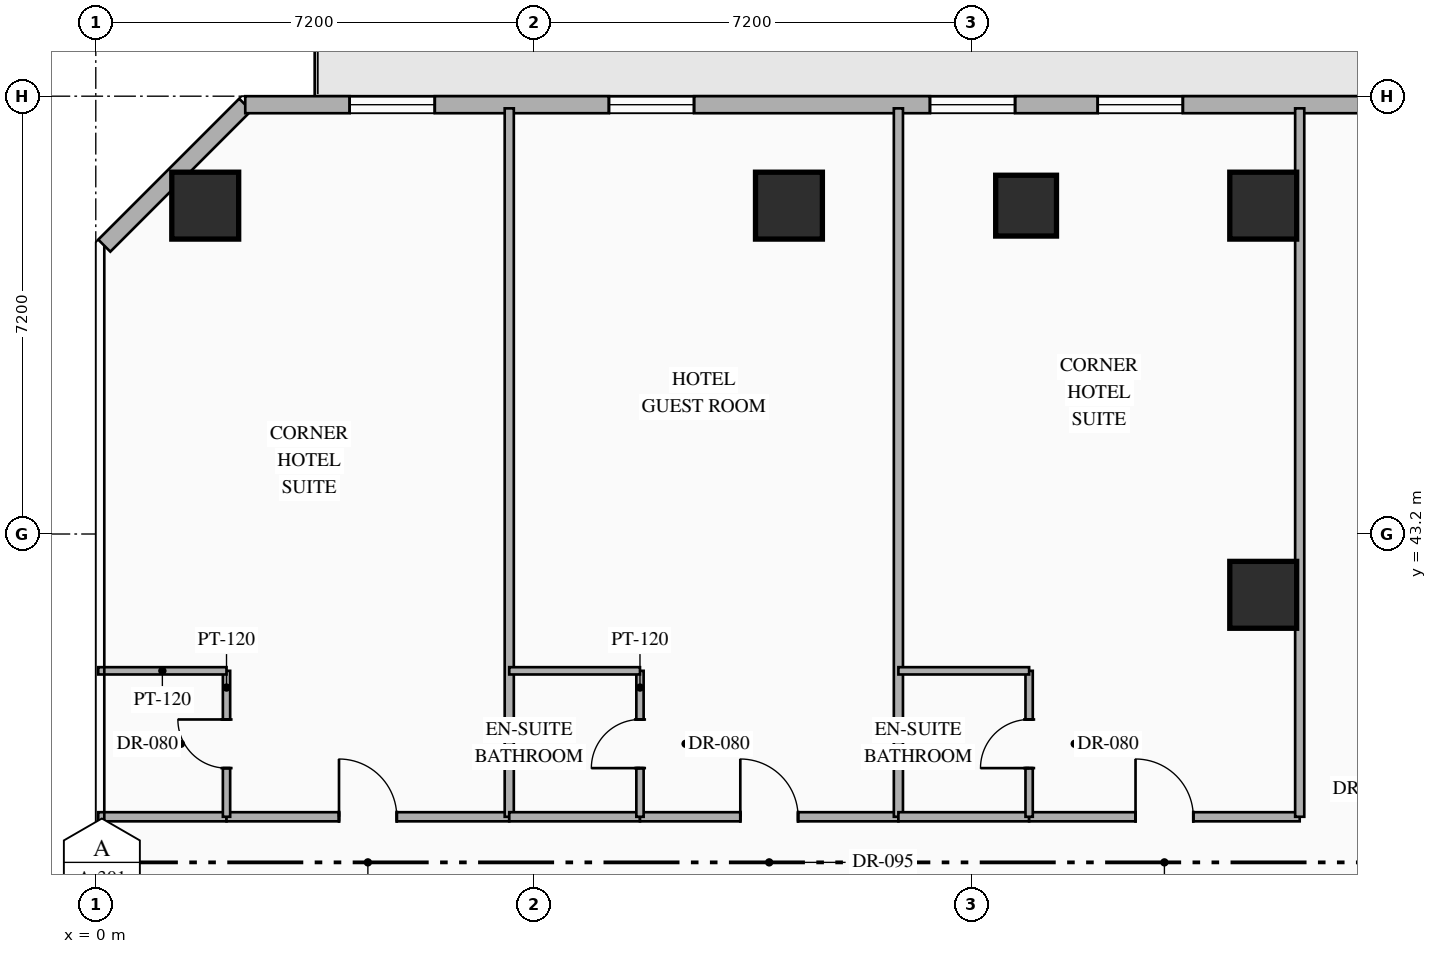
"""IFC4 building model, lengths in metres.
Left out: names, types, materials, properties, quantities, classifications, styles, units other than length and angle.
Written with IfcOpenShell. Run it as: python <this file> out.ifc"""

import sys

from ifc_helpers import new_model, si_unit, direction, frame, frame_2d, origin, origin_2d, place, context, subcontext, project, spatial, rectangle, hollow_rectangle, extrude, element, fill, save


model = new_model("IFC4")
c1 = context("Model", 3, precision=1e-05, world=origin(), true_north=direction((0.0, 1.0)))
c2 = subcontext(c1, "Body", "Model", "MODEL_VIEW")
j1 = project(units=[si_unit("LENGTHUNIT", "METRE"), si_unit("PLANEANGLEUNIT", "RADIAN")], contexts=[c1])
p1 = place(None, origin())
s1 = spatial("IfcSite", under=j1, at=p1, CompositionType="ELEMENT")
p2 = place(p1, origin())
s2 = spatial("IfcBuilding", under=s1, at=p2, CompositionType="ELEMENT")
p3 = place(p2, frame((0.0, 0.0, 36.6)))
s3 = spatial("IfcBuildingStorey", under=s2, at=p3, CompositionType="ELEMENT", Elevation=36.6)
for number, where, z_axis, x_axis in (
    (1, (1.8, 48.6, 0.0), (0.0, 0.0, 1.0), (1.0, 0.0, 0.0)),
    (2, (11.4, 48.6, 0.0), (0.0, 0.0, 1.0), (1.0, 0.0, 0.0)),
    (3, (19.2, 48.6, 0.0), (0.0, 0.0, 1.0), (1.0, 0.0, 0.0)),
    (4, (19.2, 42.2, 0.0), (0.0, 0.0, 1.0), (1.0, 0.0, 0.0)),
):
    element("IfcColumn", number, at=place(p3, frame(where, z_axis=z_axis, x_axis=x_axis)), inside=s3, PredefinedType="COLUMN", context=c2, shape_type="SweptSolid", body=[
        extrude(hollow_rectangle(XDim=1.1, YDim=1.1, WallThickness=0.04, at=origin_2d()), origin(), (0.0, 0.0, 1.0), 3.35),
    ])
p4 = place(p3, frame((15.3, 48.6, 0.0), z_axis=(0.0, 0.0, 1.0), x_axis=(1.0, 0.0, 0.0)))
e5 = element("IfcColumn", 5, at=p4, inside=s3, PredefinedType="COLUMN", context=c2, shape_type="SweptSolid", body=[
    extrude(hollow_rectangle(XDim=1.0, YDim=1.0, WallThickness=0.038, at=origin_2d()), origin(), (0.0, 0.0, 1.0), 3.35),
])
p5 = place(p3, frame((0.14, 47.942, 0.0), z_axis=(0.0, 0.0, 1.0), x_axis=(0.707106781187, 0.707106781187, 0.0)))
e6 = element("IfcWall", 6, at=p5, inside=s3, PredefinedType="STANDARD", context=c2, shape_type="SweptSolid", body=[
    extrude(rectangle(XDim=3.278, YDim=0.28, at=frame_2d((1.639, 0.0))), origin(), (0.0, 0.0, 1.0), 3.13),
])
p6 = place(p3, frame((2.458, 50.26, 0.0), z_axis=(0.0, 0.0, 1.0), x_axis=(1.0, 0.0, 0.0)))
e7 = element("IfcWall", 7, at=p6, inside=s3, PredefinedType="STANDARD", context=c2, shape_type="SweptSolid", body=[
    extrude(rectangle(XDim=40.084, YDim=0.28, at=frame_2d((20.042, 0.0))), origin(), (0.0, 0.0, 1.0), 3.13),
])
p7 = place(p6, frame((25.905, 0.0, 0.0)))
e8 = element("IfcOpeningElement", 8, at=p7, cuts=e7, PredefinedType="OPENING", context=c2, shape_type="SweptSolid", body=[
    extrude(rectangle(XDim=1.1, YDim=2.2, at=frame_2d((0.55, 1.1))), frame((0.0, 0.15, 0.0), z_axis=(0.0, -1.0, 0.0), x_axis=(1.0, 0.0, 0.0)), (0.0, 0.0, 1.0), 0.3),
])
p8 = place(p6, frame((1.717, 0.0, 0.85)))
e9 = element("IfcOpeningElement", 9, at=p8, cuts=e7, PredefinedType="OPENING", context=c2, shape_type="SweptSolid", body=[
    extrude(rectangle(XDim=1.4, YDim=1.8, at=frame_2d((0.7, 0.9))), frame((0.0, 0.15, 0.0), z_axis=(0.0, -1.0, 0.0), x_axis=(1.0, 0.0, 0.0)), (0.0, 0.0, 1.0), 0.3),
])
p9 = place(p6, frame((5.981, 0.0, 0.85)))
e10 = element("IfcOpeningElement", 10, at=p9, cuts=e7, PredefinedType="OPENING", context=c2, shape_type="SweptSolid", body=[
    extrude(rectangle(XDim=1.4, YDim=1.8, at=frame_2d((0.7, 0.9))), frame((0.0, 0.15, 0.0), z_axis=(0.0, -1.0, 0.0), x_axis=(1.0, 0.0, 0.0)), (0.0, 0.0, 1.0), 0.3),
])
p10 = place(p6, frame((11.261, 0.0, 0.85)))
e11 = element("IfcOpeningElement", 11, at=p10, cuts=e7, PredefinedType="OPENING", context=c2, shape_type="SweptSolid", body=[
    extrude(rectangle(XDim=1.4, YDim=1.8, at=frame_2d((0.7, 0.9))), frame((0.0, 0.15, 0.0), z_axis=(0.0, -1.0, 0.0), x_axis=(1.0, 0.0, 0.0)), (0.0, 0.0, 1.0), 0.3),
])
p11 = place(p6, frame((14.02, 0.0, 0.85)))
e12 = element("IfcOpeningElement", 12, at=p11, cuts=e7, PredefinedType="OPENING", context=c2, shape_type="SweptSolid", body=[
    extrude(rectangle(XDim=1.4, YDim=1.8, at=frame_2d((0.7, 0.9))), frame((0.0, 0.15, 0.0), z_axis=(0.0, -1.0, 0.0), x_axis=(1.0, 0.0, 0.0)), (0.0, 0.0, 1.0), 0.3),
])
p12 = place(p6, frame((20.789, 0.0, 0.85)))
e13 = element("IfcOpeningElement", 13, at=p12, cuts=e7, PredefinedType="OPENING", context=c2, shape_type="SweptSolid", body=[
    extrude(rectangle(XDim=1.4, YDim=1.8, at=frame_2d((0.7, 0.9))), frame((0.0, 0.15, 0.0), z_axis=(0.0, -1.0, 0.0), x_axis=(1.0, 0.0, 0.0)), (0.0, 0.0, 1.0), 0.3),
])
p13 = place(p6, frame((32.703, 0.0, 0.85)))
e14 = element("IfcOpeningElement", 14, at=p13, cuts=e7, PredefinedType="OPENING", context=c2, shape_type="SweptSolid", body=[
    extrude(rectangle(XDim=1.4, YDim=1.8, at=frame_2d((0.7, 0.9))), frame((0.0, 0.15, 0.0), z_axis=(0.0, -1.0, 0.0), x_axis=(1.0, 0.0, 0.0)), (0.0, 0.0, 1.0), 0.3),
])
p14 = place(p6, frame((36.967, 0.0, 0.85)))
e15 = element("IfcOpeningElement", 15, at=p14, cuts=e7, PredefinedType="OPENING", context=c2, shape_type="SweptSolid", body=[
    extrude(rectangle(XDim=1.4, YDim=1.8, at=frame_2d((0.7, 0.9))), frame((0.0, 0.15, 0.0), z_axis=(0.0, -1.0, 0.0), x_axis=(1.0, 0.0, 0.0)), (0.0, 0.0, 1.0), 0.3),
])
p15 = place(p3, frame((0.04, 38.55, 0.0), z_axis=(0.0, 0.0, 1.0), x_axis=(1.0, 0.0, 0.0)))
e16 = element("IfcWall", 16, at=p15, inside=s3, PredefinedType="PARTITIONING", context=c2, shape_type="SweptSolid", body=[
    extrude(rectangle(XDim=2.11, YDim=0.15, at=frame_2d((1.055, 0.0))), origin(), (0.0, 0.0, 1.0), 2.775),
])
p16 = place(p3, frame((2.15, 38.55, 0.0), z_axis=(0.0, 0.0, 1.0), x_axis=(1.0, 0.0, 0.0)))
e17 = element("IfcWall", 17, at=p16, inside=s3, PredefinedType="PARTITIONING", context=c2, shape_type="SweptSolid", body=[
    extrude(rectangle(XDim=4.65, YDim=0.15, at=frame_2d((2.325, 0.0))), origin(), (0.0, 0.0, 1.0), 2.775),
])
p17 = place(p16, frame((1.85, 0.0, 0.0)))
e18 = element("IfcOpeningElement", 18, at=p17, cuts=e17, PredefinedType="OPENING", context=c2, shape_type="SweptSolid", body=[
    extrude(rectangle(XDim=0.95, YDim=2.15, at=frame_2d((0.475, 1.075))), frame((0.0, 0.085, 0.0), z_axis=(0.0, -1.0, 0.0), x_axis=(1.0, 0.0, 0.0)), (0.0, 0.0, 1.0), 0.17),
])
p18 = place(p3, frame((2.15, 38.55, 0.0), z_axis=(0.0, 0.0, 1.0), x_axis=(0.0, 1.0, 0.0)))
e19 = element("IfcWall", 19, at=p18, inside=s3, PredefinedType="PARTITIONING", context=c2, shape_type="SweptSolid", body=[
    extrude(rectangle(XDim=2.4, YDim=0.12, at=frame_2d((1.2, 0.0))), origin(), (0.0, 0.0, 1.0), 3.13),
])
p19 = place(p18, frame((0.8, 0.0, 0.0)))
e20 = element("IfcOpeningElement", 20, at=p19, cuts=e19, PredefinedType="OPENING", context=c2, shape_type="SweptSolid", body=[
    extrude(rectangle(XDim=0.8, YDim=2.06, at=frame_2d((0.4, 1.03))), frame((0.0, 0.07, 0.0), z_axis=(0.0, -1.0, 0.0), x_axis=(1.0, 0.0, 0.0)), (0.0, 0.0, 1.0), 0.14),
])
p20 = place(p3, frame((0.04, 40.95, 0.0), z_axis=(0.0, 0.0, 1.0), x_axis=(1.0, 0.0, 0.0)))
e21 = element("IfcWall", 21, at=p20, inside=s3, PredefinedType="PARTITIONING", context=c2, shape_type="SweptSolid", body=[
    extrude(rectangle(XDim=2.11, YDim=0.12, at=frame_2d((1.055, 0.0))), origin(), (0.0, 0.0, 1.0), 2.775),
])
p21 = place(p3, frame((6.8, 38.55, 0.0), z_axis=(0.0, 0.0, 1.0), x_axis=(0.0, 1.0, 0.0)))
e22 = element("IfcWall", 22, at=p21, inside=s3, PredefinedType="PARTITIONING", context=c2, shape_type="SweptSolid", body=[
    extrude(rectangle(XDim=11.65, YDim=0.15, at=frame_2d((5.825, 0.0))), origin(), (0.0, 0.0, 1.0), 3.13),
])
p22 = place(p3, frame((6.8, 38.55, 0.0), z_axis=(0.0, 0.0, 1.0), x_axis=(1.0, 0.0, 0.0)))
e23 = element("IfcWall", 23, at=p22, inside=s3, PredefinedType="PARTITIONING", context=c2, shape_type="SweptSolid", body=[
    extrude(rectangle(XDim=2.15, YDim=0.15, at=frame_2d((1.075, 0.0))), origin(), (0.0, 0.0, 1.0), 2.775),
])
p23 = place(p3, frame((8.95, 38.55, 0.0), z_axis=(0.0, 0.0, 1.0), x_axis=(1.0, 0.0, 0.0)))
e24 = element("IfcWall", 24, at=p23, inside=s3, PredefinedType="PARTITIONING", context=c2, shape_type="SweptSolid", body=[
    extrude(rectangle(XDim=4.25, YDim=0.15, at=frame_2d((2.125, 0.0))), origin(), (0.0, 0.0, 1.0), 2.775),
])
p24 = place(p23, frame((1.65, 0.0, 0.0)))
e25 = element("IfcOpeningElement", 25, at=p24, cuts=e24, PredefinedType="OPENING", context=c2, shape_type="SweptSolid", body=[
    extrude(rectangle(XDim=0.95, YDim=2.15, at=frame_2d((0.475, 1.075))), frame((0.0, 0.085, 0.0), z_axis=(0.0, -1.0, 0.0), x_axis=(1.0, 0.0, 0.0)), (0.0, 0.0, 1.0), 0.17),
])
p25 = place(p3, frame((8.95, 38.55, 0.0), z_axis=(0.0, 0.0, 1.0), x_axis=(0.0, 1.0, 0.0)))
e26 = element("IfcWall", 26, at=p25, inside=s3, PredefinedType="PARTITIONING", context=c2, shape_type="SweptSolid", body=[
    extrude(rectangle(XDim=2.4, YDim=0.12, at=frame_2d((1.2, 0.0))), origin(), (0.0, 0.0, 1.0), 3.13),
])
p26 = place(p25, frame((0.8, 0.0, 0.0)))
e27 = element("IfcOpeningElement", 27, at=p26, cuts=e26, PredefinedType="OPENING", context=c2, shape_type="SweptSolid", body=[
    extrude(rectangle(XDim=0.8, YDim=2.06, at=frame_2d((0.4, 1.03))), frame((0.0, 0.07, 0.0), z_axis=(0.0, -1.0, 0.0), x_axis=(1.0, 0.0, 0.0)), (0.0, 0.0, 1.0), 0.14),
])
p27 = place(p3, frame((6.8, 40.95, 0.0), z_axis=(0.0, 0.0, 1.0), x_axis=(1.0, 0.0, 0.0)))
e28 = element("IfcWall", 28, at=p27, inside=s3, PredefinedType="PARTITIONING", context=c2, shape_type="SweptSolid", body=[
    extrude(rectangle(XDim=2.15, YDim=0.12, at=frame_2d((1.075, 0.0))), origin(), (0.0, 0.0, 1.0), 2.775),
])
p28 = place(p3, frame((13.2, 38.55, 0.0), z_axis=(0.0, 0.0, 1.0), x_axis=(0.0, 1.0, 0.0)))
e29 = element("IfcWall", 29, at=p28, inside=s3, PredefinedType="PARTITIONING", context=c2, shape_type="SweptSolid", body=[
    extrude(rectangle(XDim=11.65, YDim=0.15, at=frame_2d((5.825, 0.0))), origin(), (0.0, 0.0, 1.0), 3.13),
])
p29 = place(p3, frame((13.2, 38.55, 0.0), z_axis=(0.0, 0.0, 1.0), x_axis=(1.0, 0.0, 0.0)))
e30 = element("IfcWall", 30, at=p29, inside=s3, PredefinedType="PARTITIONING", context=c2, shape_type="SweptSolid", body=[
    extrude(rectangle(XDim=2.15, YDim=0.15, at=frame_2d((1.075, 0.0))), origin(), (0.0, 0.0, 1.0), 2.775),
])
p30 = place(p3, frame((15.35, 38.55, 0.0), z_axis=(0.0, 0.0, 1.0), x_axis=(1.0, 0.0, 0.0)))
e31 = element("IfcWall", 31, at=p30, inside=s3, PredefinedType="PARTITIONING", context=c2, shape_type="SweptSolid", body=[
    extrude(rectangle(XDim=4.45, YDim=0.15, at=frame_2d((2.225, 0.0))), origin(), (0.0, 0.0, 1.0), 2.775),
])
p31 = place(p30, frame((1.75, 0.0, 0.0)))
e32 = element("IfcOpeningElement", 32, at=p31, cuts=e31, PredefinedType="OPENING", context=c2, shape_type="SweptSolid", body=[
    extrude(rectangle(XDim=0.95, YDim=2.15, at=frame_2d((0.475, 1.075))), frame((0.0, 0.085, 0.0), z_axis=(0.0, -1.0, 0.0), x_axis=(1.0, 0.0, 0.0)), (0.0, 0.0, 1.0), 0.17),
])
p32 = place(p3, frame((15.35, 38.55, 0.0), z_axis=(0.0, 0.0, 1.0), x_axis=(0.0, 1.0, 0.0)))
e33 = element("IfcWall", 33, at=p32, inside=s3, PredefinedType="PARTITIONING", context=c2, shape_type="SweptSolid", body=[
    extrude(rectangle(XDim=2.4, YDim=0.12, at=frame_2d((1.2, 0.0))), origin(), (0.0, 0.0, 1.0), 3.13),
])
p33 = place(p32, frame((0.8, 0.0, 0.0)))
e34 = element("IfcOpeningElement", 34, at=p33, cuts=e33, PredefinedType="OPENING", context=c2, shape_type="SweptSolid", body=[
    extrude(rectangle(XDim=0.8, YDim=2.06, at=frame_2d((0.4, 1.03))), frame((0.0, 0.07, 0.0), z_axis=(0.0, -1.0, 0.0), x_axis=(1.0, 0.0, 0.0)), (0.0, 0.0, 1.0), 0.14),
])
p34 = place(p3, frame((13.2, 40.95, 0.0), z_axis=(0.0, 0.0, 1.0), x_axis=(1.0, 0.0, 0.0)))
e35 = element("IfcWall", 35, at=p34, inside=s3, PredefinedType="PARTITIONING", context=c2, shape_type="SweptSolid", body=[
    extrude(rectangle(XDim=2.15, YDim=0.12, at=frame_2d((1.075, 0.0))), origin(), (0.0, 0.0, 1.0), 2.775),
])
p35 = place(p3, frame((19.8, 38.55, 0.0), z_axis=(0.0, 0.0, 1.0), x_axis=(0.0, 1.0, 0.0)))
e36 = element("IfcWall", 36, at=p35, inside=s3, PredefinedType="PARTITIONING", context=c2, shape_type="SweptSolid", body=[
    extrude(rectangle(XDim=11.65, YDim=0.15, at=frame_2d((5.825, 0.0))), origin(), (0.0, 0.0, 1.0), 3.13),
])
p36 = place(p8, origin())
e37 = element("IfcWindow", 37, at=p36, inside=s3, PartitioningType="SINGLE_PANEL", PredefinedType="WINDOW", context=c2, shape_type="SweptSolid", body=[
    extrude(rectangle(XDim=1.4, YDim=1.8, at=frame_2d((0.7, 0.9))), frame((0.0, 0.03, 0.0), z_axis=(0.0, -1.0, 0.0), x_axis=(1.0, 0.0, 0.0)), (0.0, 0.0, 1.0), 0.06),
])
fill(e9, e37)
p37 = place(p9, origin())
e38 = element("IfcWindow", 38, at=p37, inside=s3, PartitioningType="SINGLE_PANEL", PredefinedType="WINDOW", context=c2, shape_type="SweptSolid", body=[
    extrude(rectangle(XDim=1.4, YDim=1.8, at=frame_2d((0.7, 0.9))), frame((0.0, 0.03, 0.0), z_axis=(0.0, -1.0, 0.0), x_axis=(1.0, 0.0, 0.0)), (0.0, 0.0, 1.0), 0.06),
])
fill(e10, e38)
p38 = place(p10, origin())
e39 = element("IfcWindow", 39, at=p38, inside=s3, PartitioningType="SINGLE_PANEL", PredefinedType="WINDOW", context=c2, shape_type="SweptSolid", body=[
    extrude(rectangle(XDim=1.4, YDim=1.8, at=frame_2d((0.7, 0.9))), frame((0.0, 0.03, 0.0), z_axis=(0.0, -1.0, 0.0), x_axis=(1.0, 0.0, 0.0)), (0.0, 0.0, 1.0), 0.06),
])
fill(e11, e39)
p39 = place(p11, origin())
e40 = element("IfcWindow", 40, at=p39, inside=s3, PartitioningType="SINGLE_PANEL", PredefinedType="WINDOW", context=c2, shape_type="SweptSolid", body=[
    extrude(rectangle(XDim=1.4, YDim=1.8, at=frame_2d((0.7, 0.9))), frame((0.0, 0.03, 0.0), z_axis=(0.0, -1.0, 0.0), x_axis=(1.0, 0.0, 0.0)), (0.0, 0.0, 1.0), 0.06),
])
fill(e12, e40)
p40 = place(p17, origin())
e41 = element("IfcDoor", 41, at=p40, inside=s3, OperationType="SINGLE_SWING_LEFT", PredefinedType="DOOR", context=c2, shape_type="SweptSolid", body=[
    extrude(rectangle(XDim=0.95, YDim=2.15, at=frame_2d((0.475, 1.075))), frame((0.0, 0.025, 0.0), z_axis=(0.0, -1.0, 0.0), x_axis=(1.0, 0.0, 0.0)), (0.0, 0.0, 1.0), 0.05),
])
fill(e18, e41)
p41 = place(p19, origin())
e42 = element("IfcDoor", 42, at=p41, inside=s3, OperationType="SINGLE_SWING_RIGHT", PredefinedType="DOOR", context=c2, shape_type="SweptSolid", body=[
    extrude(rectangle(XDim=0.8, YDim=2.06, at=frame_2d((0.4, 1.03))), frame((0.0, 0.025, 0.0), z_axis=(0.0, -1.0, 0.0), x_axis=(1.0, 0.0, 0.0)), (0.0, 0.0, 1.0), 0.05),
])
fill(e20, e42)
p42 = place(p24, origin())
e43 = element("IfcDoor", 43, at=p42, inside=s3, OperationType="SINGLE_SWING_LEFT", PredefinedType="DOOR", context=c2, shape_type="SweptSolid", body=[
    extrude(rectangle(XDim=0.95, YDim=2.15, at=frame_2d((0.475, 1.075))), frame((0.0, 0.025, 0.0), z_axis=(0.0, -1.0, 0.0), x_axis=(1.0, 0.0, 0.0)), (0.0, 0.0, 1.0), 0.05),
])
fill(e25, e43)
p43 = place(p26, origin())
e44 = element("IfcDoor", 44, at=p43, inside=s3, OperationType="SINGLE_SWING_LEFT", PredefinedType="DOOR", context=c2, shape_type="SweptSolid", body=[
    extrude(rectangle(XDim=0.8, YDim=2.06, at=frame_2d((0.4, 1.03))), frame((0.0, 0.025, 0.0), z_axis=(0.0, -1.0, 0.0), x_axis=(1.0, 0.0, 0.0)), (0.0, 0.0, 1.0), 0.05),
])
fill(e27, e44)
p44 = place(p31, origin())
e45 = element("IfcDoor", 45, at=p44, inside=s3, OperationType="SINGLE_SWING_LEFT", PredefinedType="DOOR", context=c2, shape_type="SweptSolid", body=[
    extrude(rectangle(XDim=0.95, YDim=2.15, at=frame_2d((0.475, 1.075))), frame((0.0, 0.025, 0.0), z_axis=(0.0, -1.0, 0.0), x_axis=(1.0, 0.0, 0.0)), (0.0, 0.0, 1.0), 0.05),
])
fill(e32, e45)
p45 = place(p33, origin())
e46 = element("IfcDoor", 46, at=p45, inside=s3, OperationType="SINGLE_SWING_LEFT", PredefinedType="DOOR", context=c2, shape_type="SweptSolid", body=[
    extrude(rectangle(XDim=0.8, YDim=2.06, at=frame_2d((0.4, 1.03))), frame((0.0, 0.025, 0.0), z_axis=(0.0, -1.0, 0.0), x_axis=(1.0, 0.0, 0.0)), (0.0, 0.0, 1.0), 0.05),
])
fill(e34, e46)
save(model, sys.argv[1])
